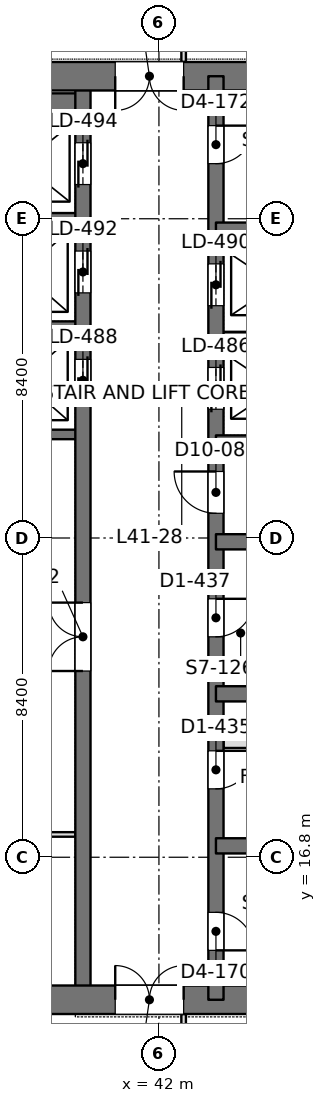
"""IFC4 building model, lengths in metres.
Left out: names, types, materials, properties, quantities, classifications, styles, units other than length and angle.
Written with IfcOpenShell. Run it as: python <this file> out.ifc"""

import sys

from ifc_helpers import new_model, si_unit, direction, frame, frame_2d, origin, place, context, subcontext, project, spatial, rectangle, extrude, element, fill, save


model = new_model("IFC4")
c1 = context("Model", 3, precision=1e-05, world=origin(), true_north=direction((0.0, 1.0)))
c2 = subcontext(c1, "Body", "Model", "MODEL_VIEW")
j1 = project(units=[si_unit("LENGTHUNIT", "METRE"), si_unit("PLANEANGLEUNIT", "RADIAN")], contexts=[c1])
p1 = place(None, origin())
s1 = spatial("IfcSite", under=j1, at=p1, CompositionType="ELEMENT")
p2 = place(p1, origin())
s2 = spatial("IfcBuilding", under=s1, at=p2, CompositionType="ELEMENT")
p3 = place(p2, frame((0.0, 0.0, 181.8)))
s3 = spatial("IfcBuildingStorey", under=s2, at=p3, CompositionType="ELEMENT", Elevation=181.8)
p4 = place(p3, frame((33.675, 13.05, 0.0), z_axis=(0.0, 0.0, 1.0), x_axis=(1.0, 0.0, 0.0)))
e1 = element("IfcWall", 1, at=p4, inside=s3, PredefinedType="SHEAR", context=c2, shape_type="SweptSolid", body=[
    extrude(rectangle(XDim=17.85, YDim=0.75, at=frame_2d((8.925, 0.0))), origin(), (0.0, 0.0, 1.0), 4.2),
])
p5 = place(p4, frame((7.175, 0.0, 0.0)))
e2 = element("IfcOpeningElement", 2, at=p5, cuts=e1, PredefinedType="OPENING", context=c2, shape_type="SweptSolid", body=[
    extrude(rectangle(XDim=1.8, YDim=2.4, at=frame_2d((0.9, 1.2))), frame((0.0, 0.385, 0.0), z_axis=(0.0, -1.0, 0.0), x_axis=(1.0, 0.0, 0.0)), (0.0, 0.0, 1.0), 0.77),
])
p6 = place(p3, frame((33.675, 37.35, 0.0), z_axis=(0.0, 0.0, 1.0), x_axis=(1.0, 0.0, 0.0)))
e3 = element("IfcWall", 3, at=p6, inside=s3, PredefinedType="SHEAR", context=c2, shape_type="SweptSolid", body=[
    extrude(rectangle(XDim=17.85, YDim=0.75, at=frame_2d((8.925, 0.0))), origin(), (0.0, 0.0, 1.0), 4.2),
])
p7 = place(p6, frame((7.175, 0.0, 0.0)))
e4 = element("IfcOpeningElement", 4, at=p7, cuts=e3, PredefinedType="OPENING", context=c2, shape_type="SweptSolid", body=[
    extrude(rectangle(XDim=1.8, YDim=2.4, at=frame_2d((0.9, 1.2))), frame((0.0, 0.385, 0.0), z_axis=(0.0, -1.0, 0.0), x_axis=(1.0, 0.0, 0.0)), (0.0, 0.0, 1.0), 0.77),
])
p8 = place(p3, frame((43.5, 13.05, 0.0), z_axis=(0.0, 0.0, 1.0), x_axis=(0.0, 1.0, 0.0)))
e5 = element("IfcWall", 5, at=p8, inside=s3, PredefinedType="SHEAR", context=c2, shape_type="SweptSolid", body=[
    extrude(rectangle(XDim=24.3, YDim=0.4, at=frame_2d((12.15, 0.0))), origin(), (0.0, 0.0, 1.0), 4.2),
])
p9 = place(p8, frame((1.3, 0.0, 0.0)))
e6 = element("IfcOpeningElement", 6, at=p9, cuts=e5, PredefinedType="OPENING", context=c2, shape_type="SweptSolid", body=[
    extrude(rectangle(XDim=1.0, YDim=2.2, at=frame_2d((0.5, 1.1))), frame((0.0, 0.21, 0.0), z_axis=(0.0, -1.0, 0.0), x_axis=(1.0, 0.0, 0.0)), (0.0, 0.0, 1.0), 0.42),
])
p10 = place(p8, frame((22.0, 0.0, 0.0)))
e7 = element("IfcOpeningElement", 7, at=p10, cuts=e5, PredefinedType="OPENING", context=c2, shape_type="SweptSolid", body=[
    extrude(rectangle(XDim=1.0, YDim=2.2, at=frame_2d((0.5, 1.1))), frame((0.0, 0.21, 0.0), z_axis=(0.0, -1.0, 0.0), x_axis=(1.0, 0.0, 0.0)), (0.0, 0.0, 1.0), 0.42),
])
p11 = place(p8, frame((5.55, 0.0, 0.0)))
e8 = element("IfcOpeningElement", 8, at=p11, cuts=e5, PredefinedType="OPENING", context=c2, shape_type="SweptSolid", body=[
    extrude(rectangle(XDim=1.0, YDim=2.2, at=frame_2d((0.5, 1.1))), frame((0.0, 0.21, 0.0), z_axis=(0.0, -1.0, 0.0), x_axis=(1.0, 0.0, 0.0)), (0.0, 0.0, 1.0), 0.42),
])
p12 = place(p8, frame((9.55, 0.0, 0.0)))
e9 = element("IfcOpeningElement", 9, at=p12, cuts=e5, PredefinedType="OPENING", context=c2, shape_type="SweptSolid", body=[
    extrude(rectangle(XDim=1.0, YDim=2.2, at=frame_2d((0.5, 1.1))), frame((0.0, 0.21, 0.0), z_axis=(0.0, -1.0, 0.0), x_axis=(1.0, 0.0, 0.0)), (0.0, 0.0, 1.0), 0.42),
])
p13 = place(p8, frame((12.8, 0.0, 0.0)))
e10 = element("IfcOpeningElement", 10, at=p13, cuts=e5, PredefinedType="OPENING", context=c2, shape_type="SweptSolid", body=[
    extrude(rectangle(XDim=1.1, YDim=2.2, at=frame_2d((0.55, 1.1))), frame((0.0, 0.21, 0.0), z_axis=(0.0, -1.0, 0.0), x_axis=(1.0, 0.0, 0.0)), (0.0, 0.0, 1.0), 0.42),
])
p14 = place(p8, frame((15.538, 0.0, 0.0)))
e11 = element("IfcOpeningElement", 11, at=p14, cuts=e5, PredefinedType="OPENING", context=c2, shape_type="SweptSolid", body=[
    extrude(rectangle(XDim=1.1, YDim=2.2, at=frame_2d((0.55, 1.1))), frame((0.0, 0.21, 0.0), z_axis=(0.0, -1.0, 0.0), x_axis=(1.0, 0.0, 0.0)), (0.0, 0.0, 1.0), 0.42),
])
p15 = place(p8, frame((18.262, 0.0, 0.0)))
e12 = element("IfcOpeningElement", 12, at=p15, cuts=e5, PredefinedType="OPENING", context=c2, shape_type="SweptSolid", body=[
    extrude(rectangle(XDim=1.1, YDim=2.2, at=frame_2d((0.55, 1.1))), frame((0.0, 0.21, 0.0), z_axis=(0.0, -1.0, 0.0), x_axis=(1.0, 0.0, 0.0)), (0.0, 0.0, 1.0), 0.42),
])
p16 = place(p3, frame((40.0, 13.05, 0.0), z_axis=(0.0, 0.0, 1.0), x_axis=(0.0, 1.0, 0.0)))
e13 = element("IfcWall", 13, at=p16, inside=s3, PredefinedType="SHEAR", context=c2, shape_type="SweptSolid", body=[
    extrude(rectangle(XDim=24.3, YDim=0.4, at=frame_2d((12.15, 0.0))), origin(), (0.0, 0.0, 1.0), 4.2),
])
p17 = place(p16, frame((15.75, 0.0, 0.0)))
e14 = element("IfcOpeningElement", 14, at=p17, cuts=e13, PredefinedType="OPENING", context=c2, shape_type="SweptSolid", body=[
    extrude(rectangle(XDim=1.1, YDim=2.2, at=frame_2d((0.55, 1.1))), frame((0.0, 0.21, 0.0), z_axis=(0.0, -1.0, 0.0), x_axis=(1.0, 0.0, 0.0)), (0.0, 0.0, 1.0), 0.42),
])
p18 = place(p16, frame((18.6, 0.0, 0.0)))
e15 = element("IfcOpeningElement", 15, at=p18, cuts=e13, PredefinedType="OPENING", context=c2, shape_type="SweptSolid", body=[
    extrude(rectangle(XDim=1.1, YDim=2.2, at=frame_2d((0.55, 1.1))), frame((0.0, 0.21, 0.0), z_axis=(0.0, -1.0, 0.0), x_axis=(1.0, 0.0, 0.0)), (0.0, 0.0, 1.0), 0.42),
])
p19 = place(p16, frame((21.45, 0.0, 0.0)))
e16 = element("IfcOpeningElement", 16, at=p19, cuts=e13, PredefinedType="OPENING", context=c2, shape_type="SweptSolid", body=[
    extrude(rectangle(XDim=1.1, YDim=2.2, at=frame_2d((0.55, 1.1))), frame((0.0, 0.21, 0.0), z_axis=(0.0, -1.0, 0.0), x_axis=(1.0, 0.0, 0.0)), (0.0, 0.0, 1.0), 0.42),
])
p20 = place(p16, frame((8.65, 0.0, 0.0)))
e17 = element("IfcOpeningElement", 17, at=p20, cuts=e13, PredefinedType="OPENING", context=c2, shape_type="SweptSolid", body=[
    extrude(rectangle(XDim=1.8, YDim=2.4, at=frame_2d((0.9, 1.2))), frame((0.0, 0.21, 0.0), z_axis=(0.0, -1.0, 0.0), x_axis=(1.0, 0.0, 0.0)), (0.0, 0.0, 1.0), 0.42),
])
for number, where, z_axis, x_axis in (
    (18, (51.15, 17.1, 0.0), (0.0, 0.0, 1.0), (-1.0, 0.0, 0.0)),
    (19, (51.15, 21.1, 0.0), (0.0, 0.0, 1.0), (-1.0, 0.0, 0.0)),
    (20, (51.15, 25.1, 0.0), (0.0, 0.0, 1.0), (-1.0, 0.0, 0.0)),
    (21, (51.15, 27.7, 0.0), (0.0, 0.0, 1.0), (-1.0, 0.0, 0.0)),
    (22, (51.15, 33.3, 0.0), (0.0, 0.0, 1.0), (-1.0, 0.0, 0.0)),
):
    element("IfcWall", number, at=place(p3, frame(where, z_axis=z_axis, x_axis=x_axis)), inside=s3, PredefinedType="SHEAR", context=c2, shape_type="SweptSolid", body=[
        extrude(rectangle(XDim=7.65, YDim=0.4, at=frame_2d((3.825, 0.0))), origin(), (0.0, 0.0, 1.0), 4.2),
    ])
p21 = place(p3, frame((46.7, 30.5, 0.0), z_axis=(0.0, 0.0, 1.0), x_axis=(-1.0, 0.0, 0.0)))
e23 = element("IfcWall", 23, at=p21, inside=s3, PredefinedType="SHEAR", context=c2, shape_type="SweptSolid", body=[
    extrude(rectangle(XDim=3.2, YDim=0.25, at=frame_2d((1.6, 0.0))), origin(), (0.0, 0.0, 1.0), 4.2),
])
p22 = place(p3, frame((40.0, 27.925, 0.0), z_axis=(0.0, 0.0, 1.0), x_axis=(-1.0, 0.0, 0.0)))
e24 = element("IfcWall", 24, at=p22, inside=s3, PredefinedType="SHEAR", context=c2, shape_type="SweptSolid", body=[
    extrude(rectangle(XDim=5.95, YDim=0.25, at=frame_2d((2.975, 0.0))), origin(), (0.0, 0.0, 1.0), 4.2),
])
for number, where, z_axis, x_axis in (
    (25, (40.0, 30.775, 0.0), (0.0, 0.0, 1.0), (-1.0, 0.0, 0.0)),
    (26, (40.0, 33.625, 0.0), (0.0, 0.0, 1.0), (-1.0, 0.0, 0.0)),
):
    element("IfcWall", number, at=place(p3, frame(where, z_axis=z_axis, x_axis=x_axis)), inside=s3, PredefinedType="SHEAR", context=c2, shape_type="SweptSolid", body=[
        extrude(rectangle(XDim=3.2, YDim=0.25, at=frame_2d((1.6, 0.0))), origin(), (0.0, 0.0, 1.0), 4.2),
    ])
p23 = place(p3, frame((40.0, 36.625, 0.0), z_axis=(0.0, 0.0, 1.0), x_axis=(-1.0, 0.0, 0.0)))
e27 = element("IfcWall", 27, at=p23, inside=s3, PredefinedType="SHEAR", context=c2, shape_type="SweptSolid", body=[
    extrude(rectangle(XDim=3.2, YDim=0.55, at=frame_2d((1.6, 0.0))), origin(), (0.0, 0.0, 1.0), 4.2),
])
p24 = place(p3, frame((33.898, 17.4, 0.0), z_axis=(0.0, 0.0, 1.0), x_axis=(1.0, 0.0, 0.0)))
e28 = element("IfcWall", 28, at=p24, inside=s3, PredefinedType="PARTITIONING", context=c2, shape_type="SweptSolid", body=[
    extrude(rectangle(XDim=5.904, YDim=0.12, at=frame_2d((2.952, 0.0))), origin(), (0.0, 0.0, 1.0), 3.55),
])
p25 = place(p3, frame((42.65, 11.158, 0.0), z_axis=(0.0, 0.0, 1.0), x_axis=(0.0, 1.0, 0.0)))
e29 = element("IfcWall", 29, at=p25, inside=s3, PredefinedType="PARTITIONING", context=c2, shape_type="SweptSolid", body=[
    extrude(rectangle(XDim=1.518, YDim=0.12, at=frame_2d((0.759, 0.0))), origin(), (0.0, 0.0, 1.0), 4.05),
])
p26 = place(p25, frame((0.192, 0.0, 0.0)))
e30 = element("IfcOpeningElement", 30, at=p26, cuts=e29, PredefinedType="OPENING", context=c2, shape_type="SweptSolid", body=[
    extrude(rectangle(XDim=1.0, YDim=2.4, at=frame_2d((0.5, 1.2))), frame((0.0, 0.07, 0.0), z_axis=(0.0, -1.0, 0.0), x_axis=(1.0, 0.0, 0.0)), (0.0, 0.0, 1.0), 0.14),
])
p27 = place(p3, frame((42.65, 37.724, 0.0), z_axis=(0.0, 0.0, 1.0), x_axis=(0.0, 1.0, 0.0)))
e31 = element("IfcWall", 31, at=p27, inside=s3, PredefinedType="PARTITIONING", context=c2, shape_type="SweptSolid", body=[
    extrude(rectangle(XDim=1.518, YDim=0.12, at=frame_2d((0.759, 0.0))), origin(), (0.0, 0.0, 1.0), 4.05),
])
p28 = place(p27, frame((0.326, 0.0, 0.0)))
e32 = element("IfcOpeningElement", 32, at=p28, cuts=e31, PredefinedType="OPENING", context=c2, shape_type="SweptSolid", body=[
    extrude(rectangle(XDim=1.0, YDim=2.4, at=frame_2d((0.5, 1.2))), frame((0.0, 0.07, 0.0), z_axis=(0.0, -1.0, 0.0), x_axis=(1.0, 0.0, 0.0)), (0.0, 0.0, 1.0), 0.14),
])
p29 = place(p3, frame((43.7, 19.8, 0.0), z_axis=(0.0, 0.0, 1.0), x_axis=(1.0, 0.0, 0.0)))
e33 = element("IfcWall", 33, at=p29, inside=s3, PredefinedType="PARTITIONING", context=c2, shape_type="SweptSolid", body=[
    extrude(rectangle(XDim=6.675, YDim=0.25, at=frame_2d((3.337, 0.0))), origin(), (0.0, 0.0, 1.0), 4.0),
])
p30 = place(p29, frame((2.863, 0.0, 0.0)))
e34 = element("IfcOpeningElement", 34, at=p30, cuts=e33, PredefinedType="OPENING", context=c2, shape_type="SweptSolid", body=[
    extrude(rectangle(XDim=0.9, YDim=2.2, at=frame_2d((0.45, 1.1))), frame((0.0, 0.135, 0.0), z_axis=(0.0, -1.0, 0.0), x_axis=(1.0, 0.0, 0.0)), (0.0, 0.0, 1.0), 0.27),
])
p31 = place(p5, origin())
e35 = element("IfcDoor", 35, at=p31, inside=s3, OperationType="DOUBLE_DOOR_SINGLE_SWING", PredefinedType="DOOR", context=c2, shape_type="SweptSolid", body=[
    extrude(rectangle(XDim=1.8, YDim=2.4, at=frame_2d((0.9, 1.2))), frame((0.0, 0.025, 0.0), z_axis=(0.0, -1.0, 0.0), x_axis=(1.0, 0.0, 0.0)), (0.0, 0.0, 1.0), 0.05),
])
fill(e2, e35)
p32 = place(p7, frame((1.8, 0.0, 0.0), z_axis=(0.0, 0.0, 1.0), x_axis=(-1.0, 0.0, 0.0)))
e36 = element("IfcDoor", 36, at=p32, inside=s3, OperationType="DOUBLE_DOOR_SINGLE_SWING", PredefinedType="DOOR", context=c2, shape_type="SweptSolid", body=[
    extrude(rectangle(XDim=1.8, YDim=2.4, at=frame_2d((0.9, 1.2))), frame((0.0, 0.025, 0.0), z_axis=(0.0, -1.0, 0.0), x_axis=(1.0, 0.0, 0.0)), (0.0, 0.0, 1.0), 0.05),
])
fill(e4, e36)
p33 = place(p9, frame((1.0, 0.0, 0.0), z_axis=(0.0, 0.0, 1.0), x_axis=(-1.0, 0.0, 0.0)))
e37 = element("IfcDoor", 37, at=p33, inside=s3, OperationType="SINGLE_SWING_RIGHT", PredefinedType="DOOR", context=c2, shape_type="SweptSolid", body=[
    extrude(rectangle(XDim=1.0, YDim=2.2, at=frame_2d((0.5, 1.1))), frame((0.0, 0.025, 0.0), z_axis=(0.0, -1.0, 0.0), x_axis=(1.0, 0.0, 0.0)), (0.0, 0.0, 1.0), 0.05),
])
fill(e6, e37)
p34 = place(p10, frame((1.0, 0.0, 0.0), z_axis=(0.0, 0.0, 1.0), x_axis=(-1.0, 0.0, 0.0)))
e38 = element("IfcDoor", 38, at=p34, inside=s3, OperationType="SINGLE_SWING_LEFT", PredefinedType="DOOR", context=c2, shape_type="SweptSolid", body=[
    extrude(rectangle(XDim=1.0, YDim=2.2, at=frame_2d((0.5, 1.1))), frame((0.0, 0.025, 0.0), z_axis=(0.0, -1.0, 0.0), x_axis=(1.0, 0.0, 0.0)), (0.0, 0.0, 1.0), 0.05),
])
fill(e7, e38)
p35 = place(p11, frame((1.0, 0.0, 0.0), z_axis=(0.0, 0.0, 1.0), x_axis=(-1.0, 0.0, 0.0)))
e39 = element("IfcDoor", 39, at=p35, inside=s3, OperationType="SINGLE_SWING_LEFT", PredefinedType="DOOR", context=c2, shape_type="SweptSolid", body=[
    extrude(rectangle(XDim=1.0, YDim=2.2, at=frame_2d((0.5, 1.1))), frame((0.0, 0.025, 0.0), z_axis=(0.0, -1.0, 0.0), x_axis=(1.0, 0.0, 0.0)), (0.0, 0.0, 1.0), 0.05),
])
fill(e8, e39)
p36 = place(p12, frame((1.0, 0.0, 0.0), z_axis=(0.0, 0.0, 1.0), x_axis=(-1.0, 0.0, 0.0)))
e40 = element("IfcDoor", 40, at=p36, inside=s3, OperationType="SINGLE_SWING_LEFT", PredefinedType="DOOR", context=c2, shape_type="SweptSolid", body=[
    extrude(rectangle(XDim=1.0, YDim=2.2, at=frame_2d((0.5, 1.1))), frame((0.0, 0.025, 0.0), z_axis=(0.0, -1.0, 0.0), x_axis=(1.0, 0.0, 0.0)), (0.0, 0.0, 1.0), 0.05),
])
fill(e9, e40)
p37 = place(p13, origin())
e41 = element("IfcDoor", 41, at=p37, inside=s3, OperationType="SINGLE_SWING_RIGHT", PredefinedType="DOOR", context=c2, shape_type="SweptSolid", body=[
    extrude(rectangle(XDim=1.1, YDim=2.2, at=frame_2d((0.55, 1.1))), frame((0.0, 0.025, 0.0), z_axis=(0.0, -1.0, 0.0), x_axis=(1.0, 0.0, 0.0)), (0.0, 0.0, 1.0), 0.05),
])
fill(e10, e41)
p38 = place(p17, origin())
e42 = element("IfcDoor", 42, at=p38, inside=s3, OperationType="DOUBLE_DOOR_SLIDING", PredefinedType="DOOR", context=c2, shape_type="SweptSolid", body=[
    extrude(rectangle(XDim=1.1, YDim=2.2, at=frame_2d((0.55, 1.1))), frame((0.0, 0.025, 0.0), z_axis=(0.0, -1.0, 0.0), x_axis=(1.0, 0.0, 0.0)), (0.0, 0.0, 1.0), 0.05),
])
fill(e14, e42)
p39 = place(p18, origin())
e43 = element("IfcDoor", 43, at=p39, inside=s3, OperationType="DOUBLE_DOOR_SLIDING", PredefinedType="DOOR", context=c2, shape_type="SweptSolid", body=[
    extrude(rectangle(XDim=1.1, YDim=2.2, at=frame_2d((0.55, 1.1))), frame((0.0, 0.025, 0.0), z_axis=(0.0, -1.0, 0.0), x_axis=(1.0, 0.0, 0.0)), (0.0, 0.0, 1.0), 0.05),
])
fill(e15, e43)
p40 = place(p19, origin())
e44 = element("IfcDoor", 44, at=p40, inside=s3, OperationType="DOUBLE_DOOR_SLIDING", PredefinedType="DOOR", context=c2, shape_type="SweptSolid", body=[
    extrude(rectangle(XDim=1.1, YDim=2.2, at=frame_2d((0.55, 1.1))), frame((0.0, 0.025, 0.0), z_axis=(0.0, -1.0, 0.0), x_axis=(1.0, 0.0, 0.0)), (0.0, 0.0, 1.0), 0.05),
])
fill(e16, e44)
p41 = place(p14, origin())
e45 = element("IfcDoor", 45, at=p41, inside=s3, OperationType="DOUBLE_DOOR_SLIDING", PredefinedType="DOOR", context=c2, shape_type="SweptSolid", body=[
    extrude(rectangle(XDim=1.1, YDim=2.2, at=frame_2d((0.55, 1.1))), frame((0.0, 0.025, 0.0), z_axis=(0.0, -1.0, 0.0), x_axis=(1.0, 0.0, 0.0)), (0.0, 0.0, 1.0), 0.05),
])
fill(e11, e45)
p42 = place(p15, origin())
e46 = element("IfcDoor", 46, at=p42, inside=s3, OperationType="DOUBLE_DOOR_SLIDING", PredefinedType="DOOR", context=c2, shape_type="SweptSolid", body=[
    extrude(rectangle(XDim=1.1, YDim=2.2, at=frame_2d((0.55, 1.1))), frame((0.0, 0.025, 0.0), z_axis=(0.0, -1.0, 0.0), x_axis=(1.0, 0.0, 0.0)), (0.0, 0.0, 1.0), 0.05),
])
fill(e12, e46)
p43 = place(p20, origin())
e47 = element("IfcDoor", 47, at=p43, inside=s3, OperationType="DOUBLE_DOOR_SINGLE_SWING", PredefinedType="DOOR", context=c2, shape_type="SweptSolid", body=[
    extrude(rectangle(XDim=1.8, YDim=2.4, at=frame_2d((0.9, 1.2))), frame((0.0, 0.025, 0.0), z_axis=(0.0, -1.0, 0.0), x_axis=(1.0, 0.0, 0.0)), (0.0, 0.0, 1.0), 0.05),
])
fill(e17, e47)
save(model, sys.argv[1])
